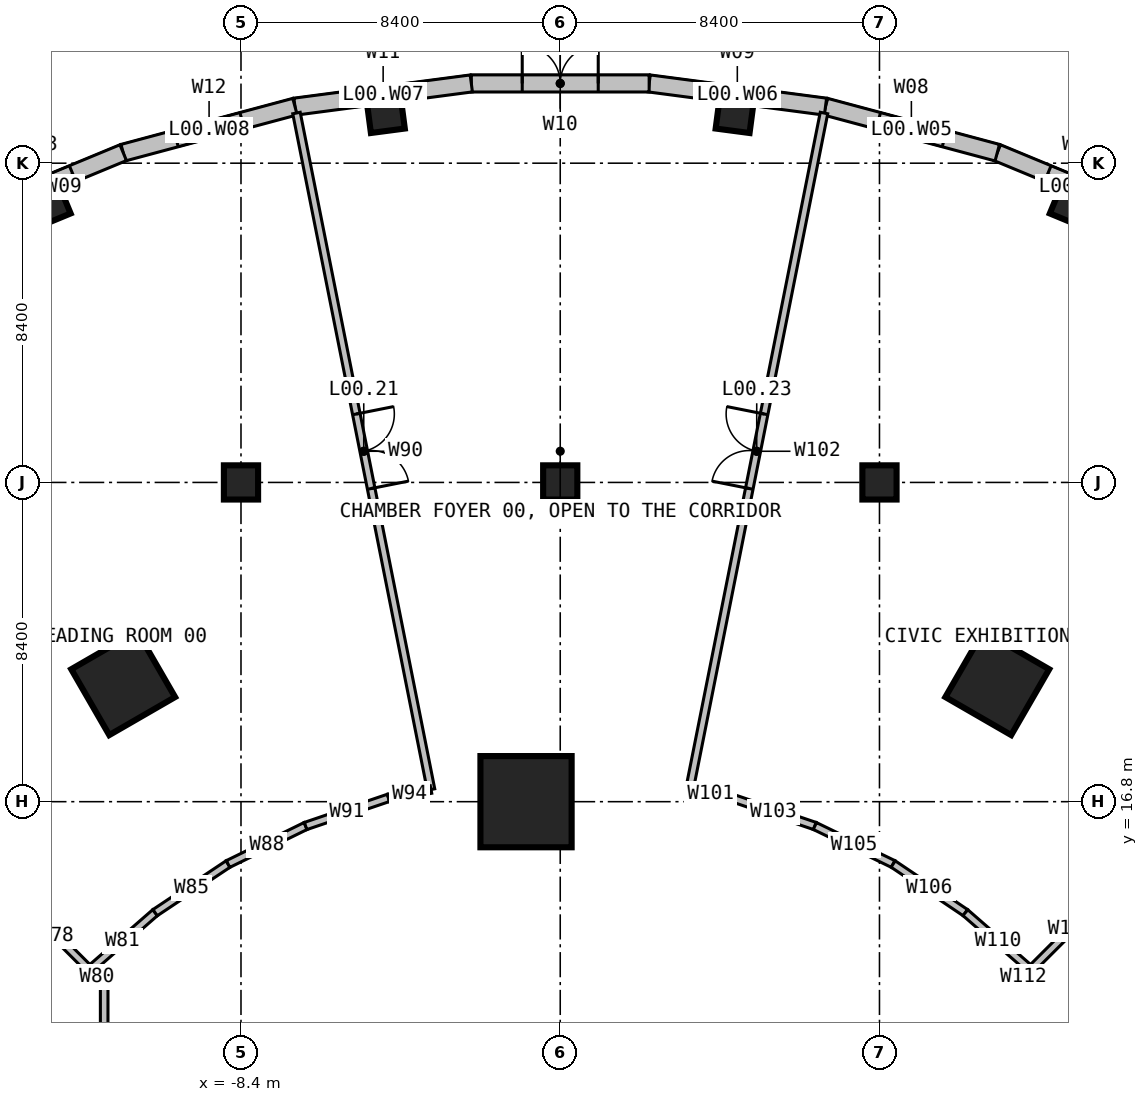
"""IFC4 building model, lengths in metres.
Left out: names, types, materials, properties, quantities, classifications, styles, units other than length and angle.
Written with IfcOpenShell. Run it as: python <this file> out.ifc"""

import sys

from ifc_helpers import new_model, si_unit, direction, frame, frame_2d, origin, origin_2d, place, context, subcontext, project, spatial, rectangle, hollow_rectangle, extrude, element, fill, save


model = new_model("IFC4")
c1 = context("Model", 3, precision=1e-05, world=origin(), true_north=direction((0.0, 1.0)))
c2 = subcontext(c1, "Body", "Model", "MODEL_VIEW")
j1 = project(units=[si_unit("LENGTHUNIT", "METRE"), si_unit("PLANEANGLEUNIT", "RADIAN")], contexts=[c1])
p1 = place(None, origin())
s1 = spatial("IfcSite", under=j1, at=p1, CompositionType="ELEMENT")
p2 = place(p1, origin())
s2 = spatial("IfcBuilding", under=s1, at=p2, CompositionType="ELEMENT")
p3 = place(p2, origin())
s3 = spatial("IfcBuildingStorey", under=s2, at=p3, CompositionType="ELEMENT", Elevation=0.0)
p4 = place(p3, frame((-8.4, 25.2, 0.0), z_axis=(0.0, 0.0, 1.0), x_axis=(1.0, 0.0, 0.0)))
e1 = element("IfcColumn", 1, at=p4, inside=s3, PredefinedType="COLUMN", context=c2, shape_type="SweptSolid", body=[
    extrude(rectangle(XDim=0.9, YDim=0.9, at=origin_2d()), origin(), (0.0, 0.0, 1.0), 6.0),
])
p5 = place(p3, frame((-0.9, 16.8, 0.0), z_axis=(0.0, 0.0, 1.0), x_axis=(1.0, 0.0, 0.0)))
e2 = element("IfcColumn", 2, at=p5, inside=s3, PredefinedType="COLUMN", context=c2, shape_type="SweptSolid", body=[
    extrude(rectangle(XDim=2.4, YDim=2.4, at=origin_2d()), origin(), (0.0, 0.0, 1.0), 6.0),
])
for number, where, z_axis, x_axis in (
    (3, (0.0, 25.2, 0.0), (0.0, 0.0, 1.0), (1.0, 0.0, 0.0)),
    (4, (8.4, 25.2, 0.0), (0.0, 0.0, 1.0), (1.0, 0.0, 0.0)),
    (5, (13.47, 32.521, 0.0), (0.0, 0.0, 1.0), (0.383, 0.924, 0.0)),
    (6, (4.594, 34.899, 0.0), (0.0, 0.0, 1.0), (0.131, 0.991, 0.0)),
    (7, (-4.594, 34.899, 0.0), (0.0, 0.0, 1.0), (-0.131, 0.991, 0.0)),
    (8, (-13.47, 32.521, 0.0), (0.0, 0.0, 1.0), (-0.383, 0.924, 0.0)),
):
    element("IfcColumn", number, at=place(p3, frame(where, z_axis=z_axis, x_axis=x_axis)), inside=s3, PredefinedType="COLUMN", context=c2, shape_type="SweptSolid", body=[
        extrude(rectangle(XDim=0.9, YDim=0.9, at=origin_2d()), origin(), (0.0, 0.0, 1.0), 6.0),
    ])
for number, where, z_axis, x_axis in (
    (9, (11.5, 19.919, 0.0), (0.0, 0.0, 1.0), (0.5, 0.866, 0.0)),
    (10, (-11.5, 19.919, 0.0), (0.0, 0.0, 1.0), (-0.5, 0.866, 0.0)),
):
    element("IfcColumn", number, at=place(p3, frame(where, z_axis=z_axis, x_axis=x_axis)), inside=s3, PredefinedType="COLUMN", context=c2, shape_type="SweptSolid", body=[
        extrude(hollow_rectangle(XDim=2.0, YDim=2.0, WallThickness=0.24, at=origin_2d()), origin(), (0.0, 0.0, 1.0), 6.0),
    ])
p6 = place(p3, frame((15.823, 32.086, 0.0), z_axis=(0.0, 0.0, 1.0), x_axis=(-0.923885213032, 0.382669718086, 0.0)))
e11 = element("IfcWall", 11, at=p6, inside=s3, PredefinedType="SOLIDWALL", context=c2, shape_type="SweptSolid", body=[
    extrude(rectangle(XDim=4.68, YDim=0.45, at=frame_2d((2.34, 0.0))), origin(), (0.0, 0.0, 1.0), 5.7),
])
p7 = place(p6, frame((1.44, 0.0, 0.9)))
e12 = element("IfcOpeningElement", 12, at=p7, cuts=e11, PredefinedType="OPENING", context=c2, shape_type="SweptSolid", body=[
    extrude(rectangle(XDim=1.8, YDim=3.6, at=frame_2d((0.9, 1.8))), frame((0.0, 0.235, 0.0), z_axis=(0.0, -1.0, 0.0), x_axis=(1.0, 0.0, 0.0)), (0.0, 0.0, 1.0), 0.47),
])
p8 = place(p3, frame((11.5, 33.876, 0.0), z_axis=(0.0, 0.0, 1.0), x_axis=(-0.965926860523, 0.258815185258, 0.0)))
e13 = element("IfcWall", 13, at=p8, inside=s3, PredefinedType="SOLIDWALL", context=c2, shape_type="SweptSolid", body=[
    extrude(rectangle(XDim=4.68, YDim=0.45, at=frame_2d((2.34, 0.0))), origin(), (0.0, 0.0, 1.0), 5.7),
])
p9 = place(p8, frame((1.44, 0.0, 0.9)))
e14 = element("IfcOpeningElement", 14, at=p9, cuts=e13, PredefinedType="OPENING", context=c2, shape_type="SweptSolid", body=[
    extrude(rectangle(XDim=1.8, YDim=3.6, at=frame_2d((0.9, 1.8))), frame((0.0, 0.235, 0.0), z_axis=(0.0, -1.0, 0.0), x_axis=(1.0, 0.0, 0.0)), (0.0, 0.0, 1.0), 0.47),
])
p10 = place(p3, frame((6.979, 35.088, 0.0), z_axis=(0.0, 0.0, 1.0), x_axis=(-0.991443459746, 0.130536838198, 0.0)))
e15 = element("IfcWall", 15, at=p10, inside=s3, PredefinedType="SOLIDWALL", context=c2, shape_type="SweptSolid", body=[
    extrude(rectangle(XDim=4.679, YDim=0.45, at=frame_2d((2.34, 0.0))), origin(), (0.0, 0.0, 1.0), 5.7),
])
p11 = place(p10, frame((1.44, 0.0, 0.9)))
e16 = element("IfcOpeningElement", 16, at=p11, cuts=e15, PredefinedType="OPENING", context=c2, shape_type="SweptSolid", body=[
    extrude(rectangle(XDim=1.8, YDim=3.6, at=frame_2d((0.9, 1.8))), frame((0.0, 0.235, 0.0), z_axis=(0.0, -1.0, 0.0), x_axis=(1.0, 0.0, 0.0)), (0.0, 0.0, 1.0), 0.47),
])
p12 = place(p3, frame((2.34, 35.698, 0.0), z_axis=(0.0, 0.0, 1.0), x_axis=(-1.0, 0.0, 0.0)))
e17 = element("IfcWall", 17, at=p12, inside=s3, PredefinedType="SOLIDWALL", context=c2, shape_type="SweptSolid", body=[
    extrude(rectangle(XDim=4.68, YDim=0.45, at=frame_2d((2.34, 0.0))), origin(), (0.0, 0.0, 1.0), 5.7),
])
p13 = place(p12, frame((1.34, 0.0, 0.0)))
e18 = element("IfcOpeningElement", 18, at=p13, cuts=e17, PredefinedType="OPENING", context=c2, shape_type="SweptSolid", body=[
    extrude(rectangle(XDim=2.0, YDim=3.0, at=frame_2d((1.0, 1.5))), frame((0.0, 0.235, 0.0), z_axis=(0.0, -1.0, 0.0), x_axis=(1.0, 0.0, 0.0)), (0.0, 0.0, 1.0), 0.47),
])
p14 = place(p3, frame((-2.34, 35.698, 0.0), z_axis=(0.0, 0.0, 1.0), x_axis=(-0.991443459746, -0.130536838198, 0.0)))
e19 = element("IfcWall", 19, at=p14, inside=s3, PredefinedType="SOLIDWALL", context=c2, shape_type="SweptSolid", body=[
    extrude(rectangle(XDim=4.679, YDim=0.45, at=frame_2d((2.34, 0.0))), origin(), (0.0, 0.0, 1.0), 5.7),
])
p15 = place(p14, frame((1.44, 0.0, 0.9)))
e20 = element("IfcOpeningElement", 20, at=p15, cuts=e19, PredefinedType="OPENING", context=c2, shape_type="SweptSolid", body=[
    extrude(rectangle(XDim=1.8, YDim=3.6, at=frame_2d((0.9, 1.8))), frame((0.0, 0.235, 0.0), z_axis=(0.0, -1.0, 0.0), x_axis=(1.0, 0.0, 0.0)), (0.0, 0.0, 1.0), 0.47),
])
p16 = place(p3, frame((-6.979, 35.088, 0.0), z_axis=(0.0, 0.0, 1.0), x_axis=(-0.965926860523, -0.258815185258, 0.0)))
e21 = element("IfcWall", 21, at=p16, inside=s3, PredefinedType="SOLIDWALL", context=c2, shape_type="SweptSolid", body=[
    extrude(rectangle(XDim=4.68, YDim=0.45, at=frame_2d((2.34, 0.0))), origin(), (0.0, 0.0, 1.0), 5.7),
])
p17 = place(p16, frame((1.44, 0.0, 0.9)))
e22 = element("IfcOpeningElement", 22, at=p17, cuts=e21, PredefinedType="OPENING", context=c2, shape_type="SweptSolid", body=[
    extrude(rectangle(XDim=1.8, YDim=3.6, at=frame_2d((0.9, 1.8))), frame((0.0, 0.235, 0.0), z_axis=(0.0, -1.0, 0.0), x_axis=(1.0, 0.0, 0.0)), (0.0, 0.0, 1.0), 0.47),
])
p18 = place(p3, frame((-11.5, 33.876, 0.0), z_axis=(0.0, 0.0, 1.0), x_axis=(-0.923885213032, -0.382669718086, 0.0)))
e23 = element("IfcWall", 23, at=p18, inside=s3, PredefinedType="SOLIDWALL", context=c2, shape_type="SweptSolid", body=[
    extrude(rectangle(XDim=4.68, YDim=0.45, at=frame_2d((2.34, 0.0))), origin(), (0.0, 0.0, 1.0), 5.7),
])
p19 = place(p18, frame((1.44, 0.0, 0.9)))
e24 = element("IfcOpeningElement", 24, at=p19, cuts=e23, PredefinedType="OPENING", context=c2, shape_type="SweptSolid", body=[
    extrude(rectangle(XDim=1.8, YDim=3.6, at=frame_2d((0.9, 1.8))), frame((0.0, 0.235, 0.0), z_axis=(0.0, -1.0, 0.0), x_axis=(1.0, 0.0, 0.0)), (0.0, 0.0, 1.0), 0.47),
])
p20 = place(p3, frame((-14.14, 14.14, 0.0), z_axis=(0.0, 0.0, 1.0), x_axis=(0.707106781187, -0.707106781187, 0.0)))
e25 = element("IfcWall", 25, at=p20, inside=s3, PredefinedType="PARTITIONING", context=c2, shape_type="SweptSolid", body=[
    extrude(rectangle(XDim=2.489, YDim=0.2, at=frame_2d((1.245, 0.0))), origin(), (0.0, 0.0, 1.0), 5.7),
])
p21 = place(p3, frame((-12.38, 12.38, 0.0), z_axis=(0.0, 0.0, 1.0), x_axis=(0.707106781187, -0.707106781187, 0.0)))
e26 = element("IfcWall", 26, at=p21, inside=s3, PredefinedType="PARTITIONING", context=c2, shape_type="SweptSolid", body=[
    extrude(rectangle(XDim=0.537, YDim=0.2, at=frame_2d((0.269, 0.0))), origin(), (0.0, 0.0, 1.0), 5.7),
])
p22 = place(p3, frame((-12.38, 12.38, 0.0), z_axis=(0.0, 0.0, 1.0), x_axis=(0.753655870045, 0.657269221512, 0.0)))
e27 = element("IfcWall", 27, at=p22, inside=s3, PredefinedType="PARTITIONING", context=c2, shape_type="SweptSolid", body=[
    extrude(rectangle(XDim=2.282, YDim=0.2, at=frame_2d((1.141, 0.0))), origin(), (0.0, 0.0, 1.0), 5.7),
])
p23 = place(p3, frame((-10.66, 13.88, 0.0), z_axis=(0.0, 0.0, 1.0), x_axis=(0.83203401661, 0.554724612041, 0.0)))
e28 = element("IfcWall", 28, at=p23, inside=s3, PredefinedType="PARTITIONING", context=c2, shape_type="SweptSolid", body=[
    extrude(rectangle(XDim=2.308, YDim=0.2, at=frame_2d((1.154, 0.0))), origin(), (0.0, 0.0, 1.0), 5.7),
])
p24 = place(p3, frame((-8.74, 15.16, 0.0), z_axis=(0.0, 0.0, 1.0), x_axis=(0.897924053718, 0.440150421736, 0.0)))
e29 = element("IfcWall", 29, at=p24, inside=s3, PredefinedType="PARTITIONING", context=c2, shape_type="SweptSolid", body=[
    extrude(rectangle(XDim=2.272, YDim=0.2, at=frame_2d((1.136, 0.0))), origin(), (0.0, 0.0, 1.0), 5.7),
])
p25 = place(p3, frame((-6.94, 34.92, 0.0), z_axis=(0.0, 0.0, 1.0), x_axis=(0.195060521619, -0.9807912076, 0.0)))
e30 = element("IfcWall", 30, at=p25, inside=s3, PredefinedType="PARTITIONING", context=c2, shape_type="SweptSolid", body=[
    extrude(rectangle(XDim=18.148, YDim=0.2, at=frame_2d((9.074, 0.0))), origin(), (0.0, 0.0, 1.0), 5.7),
])
p26 = place(p25, frame((8.074, 0.0, 0.0)))
e31 = element("IfcOpeningElement", 31, at=p26, cuts=e30, PredefinedType="OPENING", context=c2, shape_type="SweptSolid", body=[
    extrude(rectangle(XDim=2.0, YDim=2.4, at=frame_2d((1.0, 1.2))), frame((0.0, 0.11, 0.0), z_axis=(0.0, -1.0, 0.0), x_axis=(1.0, 0.0, 0.0)), (0.0, 0.0, 1.0), 0.22),
])
p27 = place(p3, frame((-6.7, 16.16, 0.0), z_axis=(0.0, 0.0, 1.0), x_axis=(0.946929712354, 0.321440694159, 0.0)))
e32 = element("IfcWall", 32, at=p27, inside=s3, PredefinedType="PARTITIONING", context=c2, shape_type="SweptSolid", body=[
    extrude(rectangle(XDim=2.302, YDim=0.2, at=frame_2d((1.151, 0.0))), origin(), (0.0, 0.0, 1.0), 5.7),
])
for number, where, z_axis, x_axis in (
    (33, (-4.52, 16.9, 0.0), (0.0, 0.0, 1.0), (0.981, 0.193, 0.0)),
    (34, (3.4, 17.12, 0.0), (0.0, 0.0, 1.0), (0.981, -0.193, 0.0)),
):
    element("IfcWall", number, at=place(p3, frame(where, z_axis=z_axis, x_axis=x_axis)), inside=s3, PredefinedType="PARTITIONING", context=c2, shape_type="SweptSolid", body=[
        extrude(rectangle(XDim=1.142, YDim=0.2, at=frame_2d((0.571, 0.0))), origin(), (0.0, 0.0, 1.0), 5.7),
    ])
p28 = place(p3, frame((3.4, 17.12, 0.0), z_axis=(0.0, 0.0, 1.0), x_axis=(0.195060521619, 0.9807912076, 0.0)))
e35 = element("IfcWall", 35, at=p28, inside=s3, PredefinedType="PARTITIONING", context=c2, shape_type="SweptSolid", body=[
    extrude(rectangle(XDim=18.148, YDim=0.2, at=frame_2d((9.074, 0.0))), origin(), (0.0, 0.0, 1.0), 5.7),
])
p29 = place(p28, frame((8.074, 0.0, 0.0)))
e36 = element("IfcOpeningElement", 36, at=p29, cuts=e35, PredefinedType="OPENING", context=c2, shape_type="SweptSolid", body=[
    extrude(rectangle(XDim=2.0, YDim=2.4, at=frame_2d((1.0, 1.2))), frame((0.0, 0.11, 0.0), z_axis=(0.0, -1.0, 0.0), x_axis=(1.0, 0.0, 0.0)), (0.0, 0.0, 1.0), 0.22),
])
p30 = place(p3, frame((4.52, 16.9, 0.0), z_axis=(0.0, 0.0, 1.0), x_axis=(0.946929712354, -0.321440694159, 0.0)))
e37 = element("IfcWall", 37, at=p30, inside=s3, PredefinedType="PARTITIONING", context=c2, shape_type="SweptSolid", body=[
    extrude(rectangle(XDim=2.302, YDim=0.2, at=frame_2d((1.151, 0.0))), origin(), (0.0, 0.0, 1.0), 5.7),
])
p31 = place(p3, frame((6.7, 16.16, 0.0), z_axis=(0.0, 0.0, 1.0), x_axis=(0.899611086074, -0.436691989637, 0.0)))
e38 = element("IfcWall", 38, at=p31, inside=s3, PredefinedType="PARTITIONING", context=c2, shape_type="SweptSolid", body=[
    extrude(rectangle(XDim=2.29, YDim=0.2, at=frame_2d((1.145, 0.0))), origin(), (0.0, 0.0, 1.0), 5.7),
])
p32 = place(p3, frame((8.76, 15.16, 0.0), z_axis=(0.0, 0.0, 1.0), x_axis=(0.829335136553, -0.558751493311, 0.0)))
e39 = element("IfcWall", 39, at=p32, inside=s3, PredefinedType="PARTITIONING", context=c2, shape_type="SweptSolid", body=[
    extrude(rectangle(XDim=2.291, YDim=0.2, at=frame_2d((1.146, 0.0))), origin(), (0.0, 0.0, 1.0), 5.7),
])
p33 = place(p3, frame((10.66, 13.88, 0.0), z_axis=(0.0, 0.0, 1.0), x_axis=(0.753655870045, -0.657269221512, 0.0)))
e40 = element("IfcWall", 40, at=p33, inside=s3, PredefinedType="PARTITIONING", context=c2, shape_type="SweptSolid", body=[
    extrude(rectangle(XDim=2.282, YDim=0.2, at=frame_2d((1.141, 0.0))), origin(), (0.0, 0.0, 1.0), 5.7),
])
p34 = place(p3, frame((12.0, 12.0, 0.0), z_axis=(0.0, 0.0, 1.0), x_axis=(0.707106781187, 0.707106781187, 0.0)))
e41 = element("IfcWall", 41, at=p34, inside=s3, PredefinedType="PARTITIONING", context=c2, shape_type="SweptSolid", body=[
    extrude(rectangle(XDim=0.537, YDim=0.2, at=frame_2d((0.269, 0.0))), origin(), (0.0, 0.0, 1.0), 5.7),
])
p35 = place(p3, frame((12.38, 12.38, 0.0), z_axis=(0.0, 0.0, 1.0), x_axis=(0.707106781187, 0.707106781187, 0.0)))
e42 = element("IfcWall", 42, at=p35, inside=s3, PredefinedType="PARTITIONING", context=c2, shape_type="SweptSolid", body=[
    extrude(rectangle(XDim=2.998, YDim=0.2, at=frame_2d((1.499, 0.0))), origin(), (0.0, 0.0, 1.0), 5.7),
])
p36 = place(p3, frame((-12.0, 12.0, 0.0), z_axis=(0.0, 0.0, 1.0), x_axis=(0.0, -1.0, 0.0)))
e43 = element("IfcWall", 43, at=p36, inside=s3, PredefinedType="PARTITIONING", context=c2, shape_type="SweptSolid", body=[
    extrude(rectangle(XDim=8.785, YDim=0.2, at=frame_2d((4.392, 0.0))), origin(), (0.0, 0.0, 1.0), 5.7),
])
p37 = place(p36, frame((3.892, 0.0, 0.0)))
e44 = element("IfcOpeningElement", 44, at=p37, cuts=e43, PredefinedType="OPENING", context=c2, shape_type="SweptSolid", body=[
    extrude(rectangle(XDim=1.0, YDim=2.2, at=frame_2d((0.5, 1.1))), frame((0.0, 0.11, 0.0), z_axis=(0.0, -1.0, 0.0), x_axis=(1.0, 0.0, 0.0)), (0.0, 0.0, 1.0), 0.22),
])
p38 = place(p7, origin())
e45 = element("IfcWindow", 45, at=p38, inside=s3, PartitioningType="SINGLE_PANEL", PredefinedType="WINDOW", context=c2, shape_type="SweptSolid", body=[
    extrude(rectangle(XDim=1.8, YDim=3.6, at=frame_2d((0.9, 1.8))), frame((0.0, 0.03, 0.0), z_axis=(0.0, -1.0, 0.0), x_axis=(1.0, 0.0, 0.0)), (0.0, 0.0, 1.0), 0.06),
])
fill(e12, e45)
p39 = place(p9, origin())
e46 = element("IfcWindow", 46, at=p39, inside=s3, PartitioningType="SINGLE_PANEL", PredefinedType="WINDOW", context=c2, shape_type="SweptSolid", body=[
    extrude(rectangle(XDim=1.8, YDim=3.6, at=frame_2d((0.9, 1.8))), frame((0.0, 0.03, 0.0), z_axis=(0.0, -1.0, 0.0), x_axis=(1.0, 0.0, 0.0)), (0.0, 0.0, 1.0), 0.06),
])
fill(e14, e46)
p40 = place(p11, origin())
e47 = element("IfcWindow", 47, at=p40, inside=s3, PartitioningType="SINGLE_PANEL", PredefinedType="WINDOW", context=c2, shape_type="SweptSolid", body=[
    extrude(rectangle(XDim=1.8, YDim=3.6, at=frame_2d((0.9, 1.8))), frame((0.0, 0.03, 0.0), z_axis=(0.0, -1.0, 0.0), x_axis=(1.0, 0.0, 0.0)), (0.0, 0.0, 1.0), 0.06),
])
fill(e16, e47)
p41 = place(p13, frame((2.0, 0.0, 0.0), z_axis=(0.0, 0.0, 1.0), x_axis=(-1.0, 0.0, 0.0)))
e48 = element("IfcDoor", 48, at=p41, inside=s3, OperationType="DOUBLE_DOOR_SINGLE_SWING", PredefinedType="DOOR", context=c2, shape_type="SweptSolid", body=[
    extrude(rectangle(XDim=2.0, YDim=3.0, at=frame_2d((1.0, 1.5))), frame((0.0, 0.025, 0.0), z_axis=(0.0, -1.0, 0.0), x_axis=(1.0, 0.0, 0.0)), (0.0, 0.0, 1.0), 0.05),
])
fill(e18, e48)
p42 = place(p15, origin())
e49 = element("IfcWindow", 49, at=p42, inside=s3, PartitioningType="SINGLE_PANEL", PredefinedType="WINDOW", context=c2, shape_type="SweptSolid", body=[
    extrude(rectangle(XDim=1.8, YDim=3.6, at=frame_2d((0.9, 1.8))), frame((0.0, 0.03, 0.0), z_axis=(0.0, -1.0, 0.0), x_axis=(1.0, 0.0, 0.0)), (0.0, 0.0, 1.0), 0.06),
])
fill(e20, e49)
p43 = place(p17, origin())
e50 = element("IfcWindow", 50, at=p43, inside=s3, PartitioningType="SINGLE_PANEL", PredefinedType="WINDOW", context=c2, shape_type="SweptSolid", body=[
    extrude(rectangle(XDim=1.8, YDim=3.6, at=frame_2d((0.9, 1.8))), frame((0.0, 0.03, 0.0), z_axis=(0.0, -1.0, 0.0), x_axis=(1.0, 0.0, 0.0)), (0.0, 0.0, 1.0), 0.06),
])
fill(e22, e50)
p44 = place(p19, origin())
e51 = element("IfcWindow", 51, at=p44, inside=s3, PartitioningType="SINGLE_PANEL", PredefinedType="WINDOW", context=c2, shape_type="SweptSolid", body=[
    extrude(rectangle(XDim=1.8, YDim=3.6, at=frame_2d((0.9, 1.8))), frame((0.0, 0.03, 0.0), z_axis=(0.0, -1.0, 0.0), x_axis=(1.0, 0.0, 0.0)), (0.0, 0.0, 1.0), 0.06),
])
fill(e24, e51)
p45 = place(p26, origin())
e52 = element("IfcDoor", 52, at=p45, inside=s3, OperationType="DOUBLE_DOOR_SINGLE_SWING", PredefinedType="DOOR", context=c2, shape_type="SweptSolid", body=[
    extrude(rectangle(XDim=2.0, YDim=2.4, at=frame_2d((1.0, 1.2))), frame((0.0, 0.025, 0.0), z_axis=(0.0, -1.0, 0.0), x_axis=(1.0, 0.0, 0.0)), (0.0, 0.0, 1.0), 0.05),
])
fill(e31, e52)
p46 = place(p29, origin())
e53 = element("IfcDoor", 53, at=p46, inside=s3, OperationType="DOUBLE_DOOR_SINGLE_SWING", PredefinedType="DOOR", context=c2, shape_type="SweptSolid", body=[
    extrude(rectangle(XDim=2.0, YDim=2.4, at=frame_2d((1.0, 1.2))), frame((0.0, 0.025, 0.0), z_axis=(0.0, -1.0, 0.0), x_axis=(1.0, 0.0, 0.0)), (0.0, 0.0, 1.0), 0.05),
])
fill(e36, e53)
save(model, sys.argv[1])
